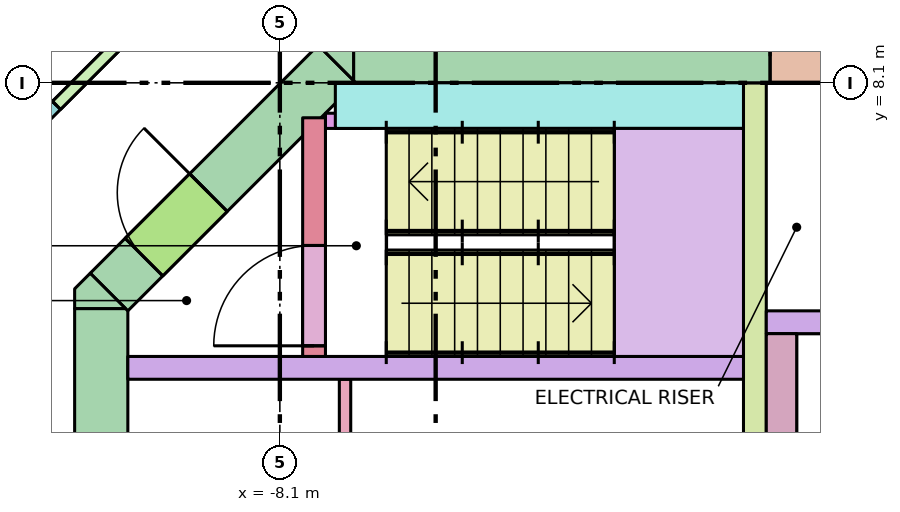
"""IFC4 building model, lengths in metres.
Left out: names, types, materials, properties, quantities, classifications, styles, units other than length and angle.
Written with IfcOpenShell. Run it as: python <this file> out.ifc"""

import sys

from ifc_helpers import new_model, si_unit, direction, frame, frame_2d, origin, place, context, subcontext, project, spatial, polyline, rectangle, outline, extrude, element, fill, save


model = new_model("IFC4")
c1 = context("Model", 3, precision=1e-05, world=origin(), true_north=direction((0.0, 1.0)))
c2 = subcontext(c1, "Body", "Model", "MODEL_VIEW")
j1 = project(units=[si_unit("LENGTHUNIT", "METRE"), si_unit("PLANEANGLEUNIT", "RADIAN")], contexts=[c1])
p1 = place(None, origin())
s1 = spatial("IfcSite", under=j1, at=p1, CompositionType="ELEMENT")
p2 = place(p1, origin())
s2 = spatial("IfcBuilding", under=s1, at=p2, CompositionType="ELEMENT")
p3 = place(p2, frame((0.0, 0.0, 226.1)))
s3 = spatial("IfcBuildingStorey", under=s2, at=p3, CompositionType="ELEMENT", Elevation=226.1)
p4 = place(p3, frame((-7.13, 8.45, -0.28), z_axis=(0.0, 0.0, 1.0), x_axis=(1.0, 0.0, 0.0)))
e1 = element("IfcWall", 1, at=p4, inside=s3, PredefinedType="SHEAR", context=c2, shape_type="SweptSolid", body=[
    extrude(rectangle(XDim=14.26, YDim=0.7, at=frame_2d((7.13, 0.0))), origin(), (0.0, 0.0, 1.0), 3.7),
])
p5 = place(p4, frame((5.48, 0.0, 0.28)))
e2 = element("IfcOpeningElement", 2, at=p5, cuts=e1, PredefinedType="OPENING", context=c2, shape_type="SweptSolid", body=[
    extrude(rectangle(XDim=0.7, YDim=2.1, at=frame_2d((0.35, 1.05))), frame((0.0, 0.36, 0.0), z_axis=(0.0, -1.0, 0.0), x_axis=(1.0, 0.0, 0.0)), (0.0, 0.0, 1.0), 0.72),
])
p6 = place(p4, frame((7.155, 0.0, 0.28)))
e3 = element("IfcOpeningElement", 3, at=p6, cuts=e1, PredefinedType="OPENING", context=c2, shape_type="SweptSolid", body=[
    extrude(rectangle(XDim=0.9, YDim=2.1, at=frame_2d((0.45, 1.05))), frame((0.0, 0.36, 0.0), z_axis=(0.0, -1.0, 0.0), x_axis=(1.0, 0.0, 0.0)), (0.0, 0.0, 1.0), 0.72),
])
p7 = place(p3, frame((-10.45, -5.13, -0.28), z_axis=(0.0, 0.0, 1.0), x_axis=(0.0, 1.0, 0.0)))
e4 = element("IfcWall", 4, at=p7, inside=s3, PredefinedType="SHEAR", context=c2, shape_type="SweptSolid", body=[
    extrude(rectangle(XDim=10.26, YDim=0.7, at=frame_2d((5.13, 0.0))), origin(), (0.0, 0.0, 1.0), 3.7),
])
p8 = place(p7, frame((4.13, 0.0, 0.28)))
e5 = element("IfcOpeningElement", 5, at=p8, cuts=e4, PredefinedType="OPENING", context=c2, shape_type="SweptSolid", body=[
    extrude(rectangle(XDim=2.0, YDim=2.1, at=frame_2d((1.0, 1.05))), frame((0.0, 0.36, 0.0), z_axis=(0.0, -1.0, 0.0), x_axis=(1.0, 0.0, 0.0)), (0.0, 0.0, 1.0), 0.72),
])
p9 = place(p3, frame((-10.347, 5.347, -0.28), z_axis=(0.0, 0.0, 1.0), x_axis=(0.707106781187, 0.707106781187, 0.0)))
e6 = element("IfcWall", 6, at=p9, inside=s3, PredefinedType="SHEAR", context=c2, shape_type="SweptSolid", body=[
    extrude(rectangle(XDim=4.243, YDim=0.7, at=frame_2d((2.121, 0.0))), origin(), (0.0, 0.0, 1.0), 3.7),
])
p10 = place(p9, frame((0.65, 0.0, 0.28)))
e7 = element("IfcOpeningElement", 7, at=p10, cuts=e6, PredefinedType="OPENING", context=c2, shape_type="SweptSolid", body=[
    extrude(rectangle(XDim=1.2, YDim=2.1, at=frame_2d((0.6, 1.05))), frame((0.0, 0.36, 0.0), z_axis=(0.0, -1.0, 0.0), x_axis=(1.0, 0.0, 0.0)), (0.0, 0.0, 1.0), 0.72),
])
p11 = place(p3, frame((0.0, 0.0, -0.28)))
e8 = element("IfcWall", 8, at=p11, inside=s3, PredefinedType="SHEAR", context=c2, shape_type="SweptSolid", body=[
    extrude(outline(polyline([(-10.595, 5.595), (-10.595, 5.595), (-10.595, 5.595), (-10.13, 5.13), (-10.8, 5.13), (-10.8, 5.13), (-10.8, 5.39), (-10.595, 5.595)])), origin(), (0.0, 0.0, 1.0), 3.7),
])
p12 = place(p3, frame((0.0, 0.0, -0.28)))
e9 = element("IfcWall", 9, at=p12, inside=s3, PredefinedType="SHEAR", context=c2, shape_type="SweptSolid", body=[
    extrude(outline(polyline([(-7.39, 8.8), (-7.13, 8.8), (-7.13, 8.8), (-7.13, 8.13), (-7.595, 8.595), (-7.595, 8.595), (-7.595, 8.595), (-7.39, 8.8)])), origin(), (0.0, 0.0, 1.0), 3.7),
])
p13 = place(p3, frame((-10.1, 4.35, 0.0), z_axis=(0.0, 0.0, 1.0), x_axis=(1.0, 0.0, 0.0)))
e10 = element("IfcWall", 10, at=p13, inside=s3, PredefinedType="SOLIDWALL", context=c2, shape_type="SweptSolid", body=[
    extrude(rectangle(XDim=8.1, YDim=0.3, at=frame_2d((4.05, 0.0))), origin(), (0.0, 0.0, 1.0), 3.42),
])
p14 = place(p3, frame((-1.85, 1.5, 0.0), z_axis=(0.0, 0.0, 1.0), x_axis=(0.0, 1.0, 0.0)))
e11 = element("IfcWall", 11, at=p14, inside=s3, PredefinedType="SHEAR", context=c2, shape_type="SweptSolid", body=[
    extrude(rectangle(XDim=6.6, YDim=0.3, at=frame_2d((3.3, 0.0))), origin(), (0.0, 0.0, 1.0), 3.42),
])
p15 = place(p3, frame((-1.5, 1.8, 0.0), z_axis=(0.0, 0.0, 1.0), x_axis=(0.0, 1.0, 0.0)))
e12 = element("IfcWall", 12, at=p15, inside=s3, PredefinedType="SOLIDWALL", context=c2, shape_type="SweptSolid", body=[
    extrude(rectangle(XDim=3.0, YDim=0.4, at=frame_2d((1.5, 0.0))), origin(), (0.0, 0.0, 1.0), 3.42),
])
p16 = place(p3, frame((-1.7, 4.95, 0.0), z_axis=(0.0, 0.0, 1.0), x_axis=(1.0, 0.0, 0.0)))
e13 = element("IfcWall", 13, at=p16, inside=s3, PredefinedType="SOLIDWALL", context=c2, shape_type="SweptSolid", body=[
    extrude(rectangle(XDim=3.4, YDim=0.3, at=frame_2d((1.7, 0.0))), origin(), (0.0, 0.0, 1.0), 3.42),
])
p17 = place(p3, frame((-7.65, 4.5, 0.0), z_axis=(0.0, 0.0, 1.0), x_axis=(0.0, 1.0, 0.0)))
e14 = element("IfcWall", 14, at=p17, inside=s3, PredefinedType="SHEAR", context=c2, shape_type="SweptSolid", body=[
    extrude(rectangle(XDim=3.14, YDim=0.3, at=frame_2d((1.57, 0.0))), origin(), (0.0, 0.0, 1.0), 3.42),
])
p18 = place(p17, frame((0.14, 0.0, 0.0)))
e15 = element("IfcOpeningElement", 15, at=p18, cuts=e14, PredefinedType="OPENING", context=c2, shape_type="SweptSolid", body=[
    extrude(rectangle(XDim=1.32, YDim=2.1, at=frame_2d((0.66, 1.05))), frame((0.0, 0.16, 0.0), z_axis=(0.0, -1.0, 0.0), x_axis=(1.0, 0.0, 0.0)), (0.0, 0.0, 1.0), 0.32),
])
p19 = place(p3, frame((-7.37, 7.8, 0.0), z_axis=(0.0, 0.0, 1.0), x_axis=(1.0, 0.0, 0.0)))
e16 = element("IfcWall", 16, at=p19, inside=s3, PredefinedType="SHEAR", context=c2, shape_type="SweptSolid", body=[
    extrude(rectangle(XDim=5.37, YDim=0.6, at=frame_2d((2.685, 0.0))), origin(), (0.0, 0.0, 1.0), 3.42),
])
p20 = place(p3, frame((-7.5, 7.6, 0.0), z_axis=(0.0, 0.0, 1.0), x_axis=(1.0, 0.0, 0.0)))
e17 = element("IfcWall", 17, at=p20, inside=s3, PredefinedType="SHEAR", context=c2, shape_type="SweptSolid", body=[
    extrude(rectangle(XDim=0.6, YDim=0.2, at=frame_2d((0.3, 0.0))), origin(), (0.0, 0.0, 1.0), 3.42),
])
p21 = place(p3, frame((-7.242, 1.65, 0.0), z_axis=(0.0, 0.0, 1.0), x_axis=(0.0, 1.0, 0.0)))
e18 = element("IfcWall", 18, at=p21, inside=s3, PredefinedType="PARTITIONING", context=c2, shape_type="SweptSolid", body=[
    extrude(rectangle(XDim=2.55, YDim=0.15, at=frame_2d((1.275, 0.0))), origin(), (0.0, 0.0, 1.0), 3.42),
])
p22 = place(p3, frame((-12.638, 6.204, 0.0), z_axis=(0.0, 0.0, 1.0), x_axis=(0.707106781187, 0.707106781187, 0.0)))
e19 = element("IfcWall", 19, at=p22, inside=s3, PredefinedType="PARTITIONING", context=c2, shape_type="SweptSolid", body=[
    extrude(rectangle(XDim=6.323, YDim=0.15, at=frame_2d((3.162, 0.0))), origin(), (0.0, 0.0, 1.0), 2.57),
])
p23 = place(p22, frame((2.262, 0.0, 0.0)))
e20 = element("IfcOpeningElement", 20, at=p23, cuts=e19, PredefinedType="OPENING", context=c2, shape_type="SweptSolid", body=[
    extrude(rectangle(XDim=1.8, YDim=2.1, at=frame_2d((0.9, 1.05))), frame((0.0, 0.085, 0.0), z_axis=(0.0, -1.0, 0.0), x_axis=(1.0, 0.0, 0.0)), (0.0, 0.0, 1.0), 0.17),
])
p24 = place(p18, origin())
e21 = element("IfcDoor", 21, at=p24, inside=s3, OperationType="DOUBLE_DOOR_SINGLE_SWING", PredefinedType="DOOR", context=c2, shape_type="SweptSolid", body=[
    extrude(rectangle(XDim=1.32, YDim=2.1, at=frame_2d((0.66, 1.05))), frame((0.0, 0.025, 0.0), z_axis=(0.0, -1.0, 0.0), x_axis=(1.0, 0.0, 0.0)), (0.0, 0.0, 1.0), 0.05),
])
fill(e15, e21)
p25 = place(p10, origin())
e22 = element("IfcDoor", 22, at=p25, inside=s3, OperationType="SINGLE_SWING_RIGHT", PredefinedType="DOOR", context=c2, shape_type="SweptSolid", body=[
    extrude(rectangle(XDim=1.2, YDim=2.1, at=frame_2d((0.6, 1.05))), frame((0.0, 0.025, 0.0), z_axis=(0.0, -1.0, 0.0), x_axis=(1.0, 0.0, 0.0)), (0.0, 0.0, 1.0), 0.05),
])
fill(e7, e22)
p26 = place(p5, origin())
e23 = element("IfcDoor", 23, at=p26, inside=s3, OperationType="SINGLE_SWING_LEFT", PredefinedType="DOOR", context=c2, shape_type="SweptSolid", body=[
    extrude(rectangle(XDim=0.7, YDim=2.1, at=frame_2d((0.35, 1.05))), frame((0.0, 0.025, 0.0), z_axis=(0.0, -1.0, 0.0), x_axis=(1.0, 0.0, 0.0)), (0.0, 0.0, 1.0), 0.05),
])
fill(e2, e23)
p27 = place(p23, origin())
e24 = element("IfcDoor", 24, at=p27, inside=s3, OperationType="DOUBLE_DOOR_SINGLE_SWING", PredefinedType="DOOR", context=c2, shape_type="SweptSolid", body=[
    extrude(rectangle(XDim=1.8, YDim=2.1, at=frame_2d((0.9, 1.05))), frame((0.0, 0.025, 0.0), z_axis=(0.0, -1.0, 0.0), x_axis=(1.0, 0.0, 0.0)), (0.0, 0.0, 1.0), 0.05),
])
fill(e20, e24)
save(model, sys.argv[1])
